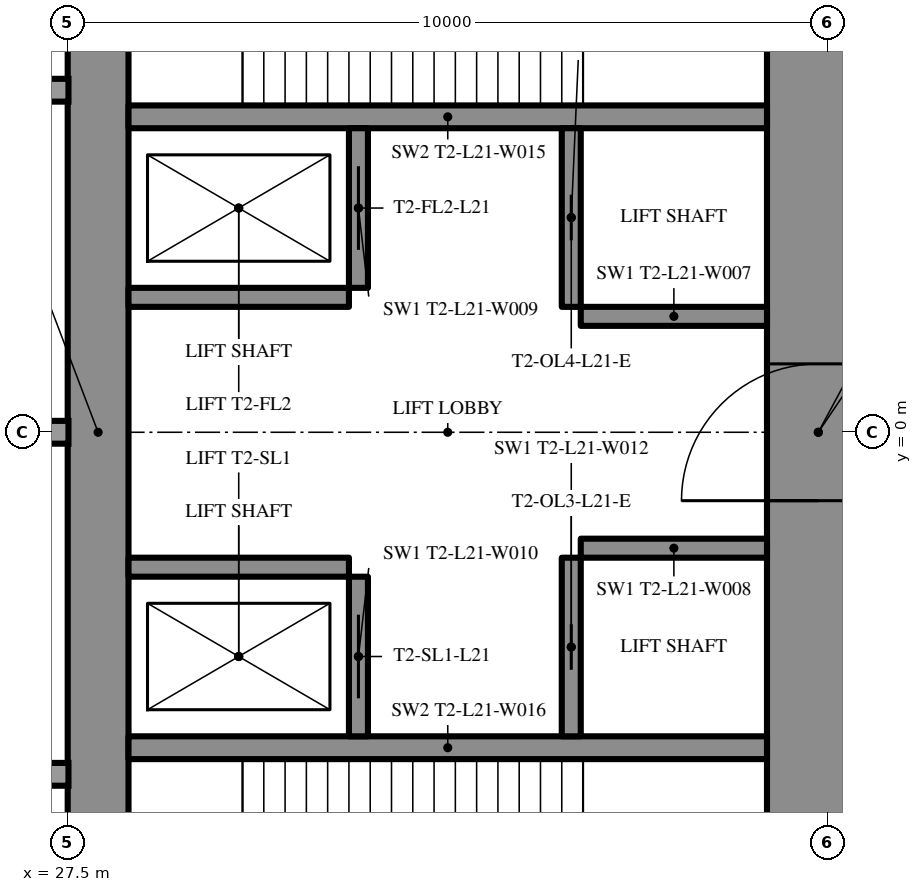
"""IFC4 building model, lengths in metres.
Left out: names, types, materials, properties, quantities, classifications, styles, units other than length and angle.
Written with IfcOpenShell. Run it as: python <this file> out.ifc"""

import sys

from ifc_helpers import new_model, si_unit, direction, frame, frame_2d, origin, place, context, subcontext, project, spatial, rectangle, extrude, element, fill, save


model = new_model("IFC4")
c1 = context("Model", 3, precision=1e-05, world=origin(), true_north=direction((0.0, 1.0)))
c2 = subcontext(c1, "Body", "Model", "MODEL_VIEW")
j1 = project(units=[si_unit("LENGTHUNIT", "METRE"), si_unit("PLANEANGLEUNIT", "RADIAN")], contexts=[c1])
p1 = place(None, origin())
s1 = spatial("IfcSite", under=j1, at=p1, CompositionType="ELEMENT")
p2 = place(p1, origin())
s2 = spatial("IfcBuilding", under=s1, at=p2, CompositionType="ELEMENT")
p3 = place(p2, frame((0.0, 0.0, 81.0)))
s3 = spatial("IfcBuildingStorey", under=s2, at=p3, CompositionType="ELEMENT", Elevation=81.0)
p4 = place(p3, frame((27.9, -8.6, 0.0), z_axis=(0.0, 0.0, 1.0), x_axis=(0.0, 1.0, 0.0)))
e1 = element("IfcWall", 1, at=p4, inside=s3, PredefinedType="SHEAR", context=c2, shape_type="SweptSolid", body=[
    extrude(rectangle(XDim=17.2, YDim=0.8, at=frame_2d((8.6, 0.0))), origin(), (0.0, 0.0, 1.0), 6.0),
])
p5 = place(p4, frame((2.45, 0.0, 0.6)))
e2 = element("IfcOpeningElement", 2, at=p5, cuts=e1, PredefinedType="OPENING", context=c2, shape_type="SweptSolid", body=[
    extrude(rectangle(XDim=0.6, YDim=4.5, at=frame_2d((0.3, 2.25))), frame((0.0, 0.41, 0.0), z_axis=(0.0, -1.0, 0.0), x_axis=(1.0, 0.0, 0.0)), (0.0, 0.0, 1.0), 0.82),
])
p6 = place(p4, frame((14.15, 0.0, 0.6)))
e3 = element("IfcOpeningElement", 3, at=p6, cuts=e1, PredefinedType="OPENING", context=c2, shape_type="SweptSolid", body=[
    extrude(rectangle(XDim=0.6, YDim=4.5, at=frame_2d((0.3, 2.25))), frame((0.0, 0.41, 0.0), z_axis=(0.0, -1.0, 0.0), x_axis=(1.0, 0.0, 0.0)), (0.0, 0.0, 1.0), 0.82),
])
p7 = place(p3, frame((37.375, -8.6, 0.0), z_axis=(0.0, 0.0, 1.0), x_axis=(0.0, 1.0, 0.0)))
e4 = element("IfcWall", 4, at=p7, inside=s3, PredefinedType="SHEAR", context=c2, shape_type="SweptSolid", body=[
    extrude(rectangle(XDim=17.2, YDim=1.35, at=frame_2d((8.6, 0.0))), origin(), (0.0, 0.0, 1.0), 6.0),
])
p8 = place(p7, frame((7.7, 0.0, 0.0)))
e5 = element("IfcOpeningElement", 5, at=p8, cuts=e4, PredefinedType="OPENING", context=c2, shape_type="SweptSolid", body=[
    extrude(rectangle(XDim=1.8, YDim=2.2, at=frame_2d((0.9, 1.1))), frame((0.0, 0.685, 0.0), z_axis=(0.0, -1.0, 0.0), x_axis=(1.0, 0.0, 0.0)), (0.0, 0.0, 1.0), 1.37),
])
for number, where, z_axis, x_axis in (
    (6, (28.3, -4.15, 0.0), (0.0, 0.0, 1.0), (1.0, 0.0, 0.0)),
    (7, (28.3, 4.15, 0.0), (0.0, 0.0, 1.0), (1.0, 0.0, 0.0)),
):
    element("IfcWall", number, at=place(p3, frame(where, z_axis=z_axis, x_axis=x_axis)), inside=s3, PredefinedType="SHEAR", context=c2, shape_type="SweptSolid", body=[
        extrude(rectangle(XDim=8.4, YDim=0.3, at=frame_2d((4.2, 0.0))), origin(), (0.0, 0.0, 1.0), 6.0),
    ])
p9 = place(p3, frame((31.325, -4.0, 0.0), z_axis=(0.0, 0.0, 1.0), x_axis=(0.0, 1.0, 0.0)))
e8 = element("IfcWall", 8, at=p9, inside=s3, PredefinedType="SHEAR", context=c2, shape_type="SweptSolid", body=[
    extrude(rectangle(XDim=2.1, YDim=0.25, at=frame_2d((1.05, 0.0))), origin(), (0.0, 0.0, 1.0), 6.0),
])
p10 = place(p9, frame((0.5, 0.0, 0.0)))
e9 = element("IfcOpeningElement", 9, at=p10, cuts=e8, PredefinedType="OPENING", context=c2, shape_type="SweptSolid", body=[
    extrude(rectangle(XDim=1.1, YDim=2.2, at=frame_2d((0.55, 1.1))), frame((0.0, 0.135, 0.0), z_axis=(0.0, -1.0, 0.0), x_axis=(1.0, 0.0, 0.0)), (0.0, 0.0, 1.0), 0.27),
])
p11 = place(p3, frame((34.125, -4.0, 0.0), z_axis=(0.0, 0.0, 1.0), x_axis=(0.0, 1.0, 0.0)))
e10 = element("IfcWall", 10, at=p11, inside=s3, PredefinedType="SHEAR", context=c2, shape_type="SweptSolid", body=[
    extrude(rectangle(XDim=2.35, YDim=0.25, at=frame_2d((1.175, 0.0))), origin(), (0.0, 0.0, 1.0), 6.0),
])
p12 = place(p11, frame((0.875, 0.0, 0.0)))
e11 = element("IfcOpeningElement", 11, at=p12, cuts=e10, PredefinedType="OPENING", context=c2, shape_type="SweptSolid", body=[
    extrude(rectangle(XDim=0.6, YDim=2.0, at=frame_2d((0.3, 1.0))), frame((0.0, 0.135, 0.0), z_axis=(0.0, -1.0, 0.0), x_axis=(1.0, 0.0, 0.0)), (0.0, 0.0, 1.0), 0.27),
])
p13 = place(p3, frame((28.3, -1.775, 0.0), z_axis=(0.0, 0.0, 1.0), x_axis=(1.0, 0.0, 0.0)))
e12 = element("IfcWall", 12, at=p13, inside=s3, PredefinedType="SHEAR", context=c2, shape_type="SweptSolid", body=[
    extrude(rectangle(XDim=2.9, YDim=0.25, at=frame_2d((1.45, 0.0))), origin(), (0.0, 0.0, 1.0), 6.0),
])
p14 = place(p3, frame((34.25, -1.525, 0.0), z_axis=(0.0, 0.0, 1.0), x_axis=(1.0, 0.0, 0.0)))
e13 = element("IfcWall", 13, at=p14, inside=s3, PredefinedType="SHEAR", context=c2, shape_type="SweptSolid", body=[
    extrude(rectangle(XDim=2.45, YDim=0.25, at=frame_2d((1.225, 0.0))), origin(), (0.0, 0.0, 1.0), 6.0),
])
p15 = place(p3, frame((31.325, 1.9, 0.0), z_axis=(0.0, 0.0, 1.0), x_axis=(0.0, 1.0, 0.0)))
e14 = element("IfcWall", 14, at=p15, inside=s3, PredefinedType="SHEAR", context=c2, shape_type="SweptSolid", body=[
    extrude(rectangle(XDim=2.1, YDim=0.25, at=frame_2d((1.05, 0.0))), origin(), (0.0, 0.0, 1.0), 6.0),
])
p16 = place(p15, frame((0.5, 0.0, 0.0)))
e15 = element("IfcOpeningElement", 15, at=p16, cuts=e14, PredefinedType="OPENING", context=c2, shape_type="SweptSolid", body=[
    extrude(rectangle(XDim=1.1, YDim=2.2, at=frame_2d((0.55, 1.1))), frame((0.0, 0.135, 0.0), z_axis=(0.0, -1.0, 0.0), x_axis=(1.0, 0.0, 0.0)), (0.0, 0.0, 1.0), 0.27),
])
p17 = place(p3, frame((34.125, 1.65, 0.0), z_axis=(0.0, 0.0, 1.0), x_axis=(0.0, 1.0, 0.0)))
e16 = element("IfcWall", 16, at=p17, inside=s3, PredefinedType="SHEAR", context=c2, shape_type="SweptSolid", body=[
    extrude(rectangle(XDim=2.35, YDim=0.25, at=frame_2d((1.175, 0.0))), origin(), (0.0, 0.0, 1.0), 6.0),
])
p18 = place(p17, frame((0.875, 0.0, 0.0)))
e17 = element("IfcOpeningElement", 17, at=p18, cuts=e16, PredefinedType="OPENING", context=c2, shape_type="SweptSolid", body=[
    extrude(rectangle(XDim=0.6, YDim=2.0, at=frame_2d((0.3, 1.0))), frame((0.0, 0.135, 0.0), z_axis=(0.0, -1.0, 0.0), x_axis=(1.0, 0.0, 0.0)), (0.0, 0.0, 1.0), 0.27),
])
p19 = place(p3, frame((28.3, 1.775, 0.0), z_axis=(0.0, 0.0, 1.0), x_axis=(1.0, 0.0, 0.0)))
e18 = element("IfcWall", 18, at=p19, inside=s3, PredefinedType="SHEAR", context=c2, shape_type="SweptSolid", body=[
    extrude(rectangle(XDim=2.9, YDim=0.25, at=frame_2d((1.45, 0.0))), origin(), (0.0, 0.0, 1.0), 6.0),
])
p20 = place(p3, frame((34.25, 1.525, 0.0), z_axis=(0.0, 0.0, 1.0), x_axis=(1.0, 0.0, 0.0)))
e19 = element("IfcWall", 19, at=p20, inside=s3, PredefinedType="SHEAR", context=c2, shape_type="SweptSolid", body=[
    extrude(rectangle(XDim=2.45, YDim=0.25, at=frame_2d((1.225, 0.0))), origin(), (0.0, 0.0, 1.0), 6.0),
])
p21 = place(p3, frame((27.2, -13.8, 0.0), z_axis=(0.0, 0.0, 1.0), x_axis=(0.866027159892, 0.499996958321, 0.0)))
e20 = element("IfcWall", 20, at=p21, inside=s3, PredefinedType="SHEAR", context=c2, shape_type="SweptSolid", body=[
    extrude(rectangle(XDim=27.947, YDim=1.2, at=frame_2d((13.973, 0.0))), origin(), (0.0, 0.0, 1.0), 6.0),
])
p22 = place(p21, frame((4.6, 0.0, 0.0)))
e21 = element("IfcOpeningElement", 21, at=p22, cuts=e20, PredefinedType="OPENING", context=c2, shape_type="SweptSolid", body=[
    extrude(rectangle(XDim=1.0, YDim=2.2, at=frame_2d((0.5, 1.1))), frame((0.0, 0.61, 0.0), z_axis=(0.0, -1.0, 0.0), x_axis=(1.0, 0.0, 0.0)), (0.0, 0.0, 1.0), 1.22),
])
p23 = place(p21, frame((13.568, 0.0, 0.0)))
e22 = element("IfcOpeningElement", 22, at=p23, cuts=e20, PredefinedType="OPENING", context=c2, shape_type="SweptSolid", body=[
    extrude(rectangle(XDim=1.8, YDim=2.2, at=frame_2d((0.9, 1.1))), frame((0.0, 0.61, 0.0), z_axis=(0.0, -1.0, 0.0), x_axis=(1.0, 0.0, 0.0)), (0.0, 0.0, 1.0), 1.22),
])
p24 = place(p3, frame((27.2, 13.8, 0.0), z_axis=(0.0, 0.0, 1.0), x_axis=(0.866024515034, -0.500001539357, 0.0)))
e23 = element("IfcWall", 23, at=p24, inside=s3, PredefinedType="SHEAR", context=c2, shape_type="SweptSolid", body=[
    extrude(rectangle(XDim=26.907, YDim=1.2, at=frame_2d((13.454, 0.0))), origin(), (0.0, 0.0, 1.0), 6.0),
])
p25 = place(p24, frame((4.6, 0.0, 0.0)))
e24 = element("IfcOpeningElement", 24, at=p25, cuts=e23, PredefinedType="OPENING", context=c2, shape_type="SweptSolid", body=[
    extrude(rectangle(XDim=1.0, YDim=2.2, at=frame_2d((0.5, 1.1))), frame((0.0, 0.61, 0.0), z_axis=(0.0, -1.0, 0.0), x_axis=(1.0, 0.0, 0.0)), (0.0, 0.0, 1.0), 1.22),
])
p26 = place(p24, frame((13.568, 0.0, 0.0)))
e25 = element("IfcOpeningElement", 25, at=p26, cuts=e23, PredefinedType="OPENING", context=c2, shape_type="SweptSolid", body=[
    extrude(rectangle(XDim=1.8, YDim=2.2, at=frame_2d((0.9, 1.1))), frame((0.0, 0.61, 0.0), z_axis=(0.0, -1.0, 0.0), x_axis=(1.0, 0.0, 0.0)), (0.0, 0.0, 1.0), 1.22),
])
p27 = place(p3, frame((36.834, 10.894, 0.0), z_axis=(0.0, 0.0, 1.0), x_axis=(0.866028157229, -0.499995230863, 0.0)))
e26 = element("IfcWall", 26, at=p27, inside=s3, PredefinedType="PARTITIONING", context=c2, shape_type="SweptSolid", body=[
    extrude(rectangle(XDim=21.667, YDim=0.2, at=frame_2d((10.833, 0.0))), origin(), (0.0, 0.0, 1.0), 5.75),
])
p28 = place(p27, frame((14.594, 0.0, 0.0)))
e27 = element("IfcOpeningElement", 27, at=p28, cuts=e26, PredefinedType="OPENING", context=c2, shape_type="SweptSolid", body=[
    extrude(rectangle(XDim=1.8, YDim=2.2, at=frame_2d((0.9, 1.1))), frame((0.0, 0.11, 0.0), z_axis=(0.0, -1.0, 0.0), x_axis=(1.0, 0.0, 0.0)), (0.0, 0.0, 1.0), 0.22),
])
p29 = place(p27, frame((4.073, 0.0, 0.0)))
e28 = element("IfcOpeningElement", 28, at=p29, cuts=e26, PredefinedType="OPENING", context=c2, shape_type="SweptSolid", body=[
    extrude(rectangle(XDim=2.0, YDim=2.4, at=frame_2d((1.0, 1.2))), frame((0.0, 0.11, 0.0), z_axis=(0.0, -1.0, 0.0), x_axis=(1.0, 0.0, 0.0)), (0.0, 0.0, 1.0), 0.22),
])
p30 = place(p8, origin())
e29 = element("IfcDoor", 29, at=p30, inside=s3, OperationType="DOUBLE_DOOR_SINGLE_SWING", PredefinedType="DOOR", context=c2, shape_type="SweptSolid", body=[
    extrude(rectangle(XDim=1.8, YDim=2.2, at=frame_2d((0.9, 1.1))), frame((0.0, 0.025, 0.0), z_axis=(0.0, -1.0, 0.0), x_axis=(1.0, 0.0, 0.0)), (0.0, 0.0, 1.0), 0.05),
])
fill(e5, e29)
p31 = place(p10, origin())
e30 = element("IfcDoor", 30, at=p31, inside=s3, OperationType="SLIDING_TO_LEFT", PredefinedType="USERDEFINED", context=c2, shape_type="SweptSolid", body=[
    extrude(rectangle(XDim=1.1, YDim=2.2, at=frame_2d((0.55, 1.1))), frame((0.0, 0.025, 0.0), z_axis=(0.0, -1.0, 0.0), x_axis=(1.0, 0.0, 0.0)), (0.0, 0.0, 1.0), 0.05),
])
fill(e9, e30)
p32 = place(p16, origin())
e31 = element("IfcDoor", 31, at=p32, inside=s3, OperationType="SLIDING_TO_LEFT", PredefinedType="USERDEFINED", context=c2, shape_type="SweptSolid", body=[
    extrude(rectangle(XDim=1.1, YDim=2.2, at=frame_2d((0.55, 1.1))), frame((0.0, 0.025, 0.0), z_axis=(0.0, -1.0, 0.0), x_axis=(1.0, 0.0, 0.0)), (0.0, 0.0, 1.0), 0.05),
])
fill(e15, e31)
p33 = place(p12, origin())
e32 = element("IfcDoor", 32, at=p33, inside=s3, OperationType="SLIDING_TO_LEFT", PredefinedType="DOOR", context=c2, shape_type="SweptSolid", body=[
    extrude(rectangle(XDim=0.6, YDim=2.0, at=frame_2d((0.3, 1.0))), frame((0.0, 0.025, 0.0), z_axis=(0.0, -1.0, 0.0), x_axis=(1.0, 0.0, 0.0)), (0.0, 0.0, 1.0), 0.05),
])
fill(e11, e32)
p34 = place(p18, origin())
e33 = element("IfcDoor", 33, at=p34, inside=s3, OperationType="SLIDING_TO_LEFT", PredefinedType="DOOR", context=c2, shape_type="SweptSolid", body=[
    extrude(rectangle(XDim=0.6, YDim=2.0, at=frame_2d((0.3, 1.0))), frame((0.0, 0.025, 0.0), z_axis=(0.0, -1.0, 0.0), x_axis=(1.0, 0.0, 0.0)), (0.0, 0.0, 1.0), 0.05),
])
fill(e17, e33)
save(model, sys.argv[1])
